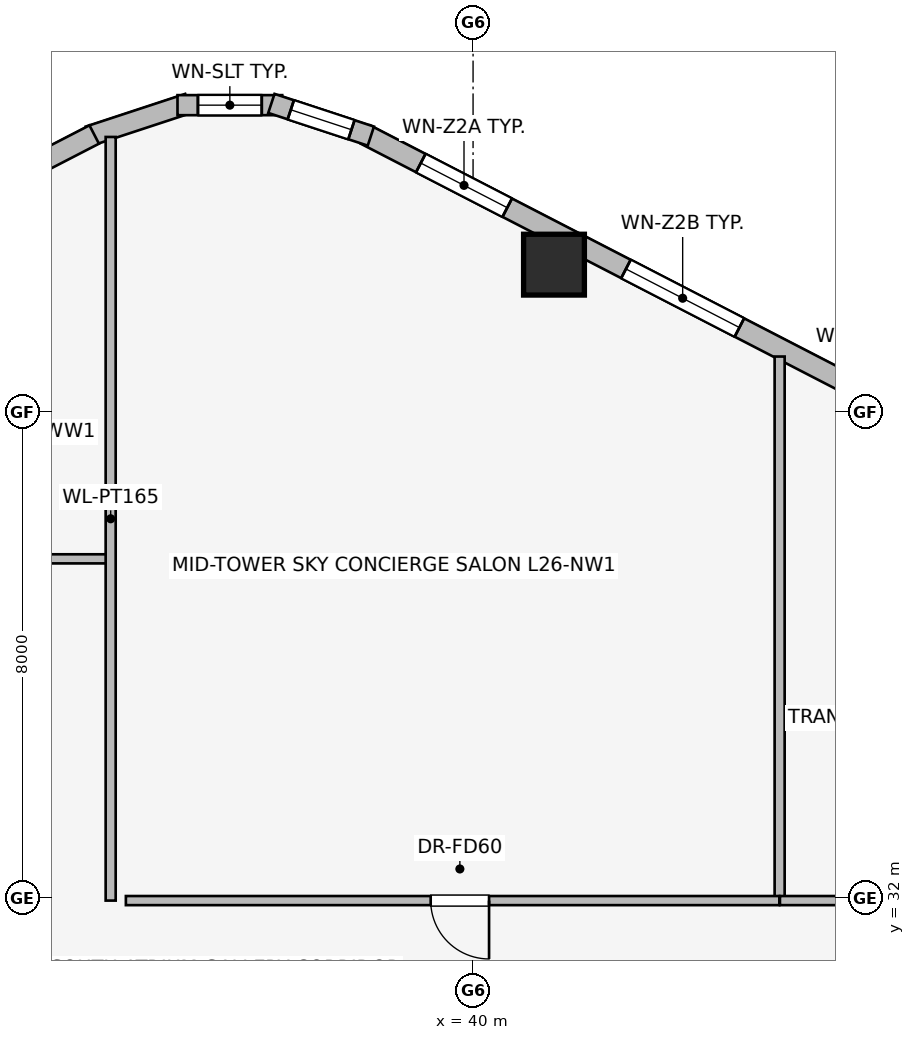
"""IFC4 building model, lengths in metres.
Left out: names, types, materials, properties, quantities, classifications, styles, units other than length and angle.
Written with IfcOpenShell. Run it as: python <this file> out.ifc"""

import sys

from ifc_helpers import new_model, si_unit, direction, frame, frame_2d, origin, origin_2d, place, context, subcontext, project, spatial, rectangle, extrude, element, fill, save


model = new_model("IFC4")
c1 = context("Model", 3, precision=1e-05, world=origin(), true_north=direction((0.0, 1.0)))
c2 = subcontext(c1, "Body", "Model", "MODEL_VIEW")
j1 = project(units=[si_unit("LENGTHUNIT", "METRE"), si_unit("PLANEANGLEUNIT", "RADIAN")], contexts=[c1])
p1 = place(None, origin())
s1 = spatial("IfcSite", under=j1, at=p1, CompositionType="ELEMENT")
p2 = place(p1, origin())
s2 = spatial("IfcBuilding", under=s1, at=p2, CompositionType="ELEMENT")
p3 = place(p2, frame((0.0, 0.0, 101.55)))
s3 = spatial("IfcBuildingStorey", under=s2, at=p3, CompositionType="ELEMENT", Elevation=101.55)
p4 = place(p3, frame((41.331, 42.418, 0.0), z_axis=(0.0, 0.0, 1.0), x_axis=(1.0, 0.0, 0.0)))
e1 = element("IfcColumn", 1, at=p4, inside=s3, PredefinedType="COLUMN", context=c2, shape_type="SweptSolid", body=[
    extrude(rectangle(XDim=1.0, YDim=1.0, at=origin_2d()), origin(), (0.0, 0.0, 1.0), 3.45),
])
p5 = place(p3, frame((38.231, 44.558, 0.0), z_axis=(0.0, 0.0, 1.0), x_axis=(0.888613612362, -0.458656568606, 0.0)))
e2 = element("IfcWall", 2, at=p5, inside=s3, PredefinedType="STANDARD", context=c2, shape_type="SweptSolid", body=[
    extrude(rectangle(XDim=18.681, YDim=0.34, at=frame_2d((9.34, 0.0))), origin(), (0.0, 0.0, 1.0), 3.19),
])
p6 = place(p5, frame((1.023, 0.0, 0.75)))
e3 = element("IfcOpeningElement", 3, at=p6, cuts=e2, PredefinedType="OPENING", context=c2, shape_type="SweptSolid", body=[
    extrude(rectangle(XDim=1.6, YDim=1.55, at=frame_2d((0.8, 0.775))), frame((0.0, 0.18, 0.0), z_axis=(0.0, -1.0, 0.0), x_axis=(1.0, 0.0, 0.0)), (0.0, 0.0, 1.0), 0.36),
])
p7 = place(p5, frame((4.82, 0.0, 0.75)))
e4 = element("IfcOpeningElement", 4, at=p7, cuts=e2, PredefinedType="OPENING", context=c2, shape_type="SweptSolid", body=[
    extrude(rectangle(XDim=2.1, YDim=1.5, at=frame_2d((1.05, 0.75))), frame((0.0, 0.18, 0.0), z_axis=(0.0, -1.0, 0.0), x_axis=(1.0, 0.0, 0.0)), (0.0, 0.0, 1.0), 0.36),
])
p8 = place(p5, frame((8.843, 0.0, 0.75)))
e5 = element("IfcOpeningElement", 5, at=p8, cuts=e2, PredefinedType="OPENING", context=c2, shape_type="SweptSolid", body=[
    extrude(rectangle(XDim=1.6, YDim=1.55, at=frame_2d((0.8, 0.775))), frame((0.0, 0.18, 0.0), z_axis=(0.0, -1.0, 0.0), x_axis=(1.0, 0.0, 0.0)), (0.0, 0.0, 1.0), 0.36),
])
p9 = place(p5, frame((11.951, 0.0, 0.75)))
e6 = element("IfcOpeningElement", 6, at=p9, cuts=e2, PredefinedType="OPENING", context=c2, shape_type="SweptSolid", body=[
    extrude(rectangle(XDim=1.6, YDim=1.55, at=frame_2d((0.8, 0.775))), frame((0.0, 0.18, 0.0), z_axis=(0.0, -1.0, 0.0), x_axis=(1.0, 0.0, 0.0)), (0.0, 0.0, 1.0), 0.36),
])
p10 = place(p5, frame((15.808, 0.0, 0.75)))
e7 = element("IfcOpeningElement", 7, at=p10, cuts=e2, PredefinedType="OPENING", context=c2, shape_type="SweptSolid", body=[
    extrude(rectangle(XDim=2.1, YDim=1.5, at=frame_2d((1.05, 0.75))), frame((0.0, 0.18, 0.0), z_axis=(0.0, -1.0, 0.0), x_axis=(1.0, 0.0, 0.0)), (0.0, 0.0, 1.0), 0.36),
])
p11 = place(p3, frame((33.681, 44.532, 0.0), z_axis=(0.0, 0.0, 1.0), x_axis=(0.949937416267, 0.312440242569, 0.0)))
e8 = element("IfcWall", 8, at=p11, inside=s3, PredefinedType="STANDARD", context=c2, shape_type="SweptSolid", body=[
    extrude(rectangle(XDim=1.722, YDim=0.33, at=frame_2d((0.861, 0.0))), origin(), (0.0, 0.0, 1.0), 3.19),
])
p12 = place(p3, frame((35.139, 45.041, 0.0), z_axis=(0.0, 0.0, 1.0), x_axis=(1.0, 0.0, 0.0)))
e9 = element("IfcWall", 9, at=p12, inside=s3, PredefinedType="STANDARD", context=c2, shape_type="SweptSolid", body=[
    extrude(rectangle(XDim=1.722, YDim=0.33, at=frame_2d((0.861, 0.0))), origin(), (0.0, 0.0, 1.0), 3.19),
])
p13 = place(p12, frame((0.336, 0.0, 0.75)))
e10 = element("IfcOpeningElement", 10, at=p13, cuts=e9, PredefinedType="OPENING", context=c2, shape_type="SweptSolid", body=[
    extrude(rectangle(XDim=1.05, YDim=1.4, at=frame_2d((0.525, 0.7))), frame((0.0, 0.175, 0.0), z_axis=(0.0, -1.0, 0.0), x_axis=(1.0, 0.0, 0.0)), (0.0, 0.0, 1.0), 0.35),
])
p14 = place(p3, frame((36.683, 45.07, 0.0), z_axis=(0.0, 0.0, 1.0), x_axis=(0.949937416267, -0.312440242569, 0.0)))
e11 = element("IfcWall", 11, at=p14, inside=s3, PredefinedType="STANDARD", context=c2, shape_type="SweptSolid", body=[
    extrude(rectangle(XDim=1.722, YDim=0.33, at=frame_2d((0.861, 0.0))), origin(), (0.0, 0.0, 1.0), 3.19),
])
p15 = place(p14, frame((0.336, 0.0, 0.75)))
e12 = element("IfcOpeningElement", 12, at=p15, cuts=e11, PredefinedType="OPENING", context=c2, shape_type="SweptSolid", body=[
    extrude(rectangle(XDim=1.05, YDim=1.4, at=frame_2d((0.525, 0.7))), frame((0.0, 0.175, 0.0), z_axis=(0.0, -1.0, 0.0), x_axis=(1.0, 0.0, 0.0)), (0.0, 0.0, 1.0), 0.35),
])
p16 = place(p3, frame((17.169, 35.99, 0.0), z_axis=(0.0, 0.0, 1.0), x_axis=(0.888613612362, 0.458656568606, 0.0)))
e13 = element("IfcWall", 13, at=p16, inside=s3, PredefinedType="STANDARD", context=c2, shape_type="SweptSolid", body=[
    extrude(rectangle(XDim=18.681, YDim=0.34, at=frame_2d((9.34, 0.0))), origin(), (0.0, 0.0, 1.0), 2.494),
])
p17 = place(p16, frame((1.298, 0.0, 0.75)))
e14 = element("IfcOpeningElement", 14, at=p17, cuts=e13, PredefinedType="OPENING", context=c2, shape_type="SweptSolid", body=[
    extrude(rectangle(XDim=1.05, YDim=1.4, at=frame_2d((0.525, 0.7))), frame((0.0, 0.18, 0.0), z_axis=(0.0, -1.0, 0.0), x_axis=(1.0, 0.0, 0.0)), (0.0, 0.0, 1.0), 0.36),
])
p18 = place(p16, frame((4.981, 0.0, 0.75)))
e15 = element("IfcOpeningElement", 15, at=p18, cuts=e13, PredefinedType="OPENING", context=c2, shape_type="SweptSolid", body=[
    extrude(rectangle(XDim=2.1, YDim=1.5, at=frame_2d((1.05, 0.75))), frame((0.0, 0.18, 0.0), z_axis=(0.0, -1.0, 0.0), x_axis=(1.0, 0.0, 0.0)), (0.0, 0.0, 1.0), 0.36),
])
p19 = place(p16, frame((8.29, 0.0, 0.75)))
e16 = element("IfcOpeningElement", 16, at=p19, cuts=e13, PredefinedType="OPENING", context=c2, shape_type="SweptSolid", body=[
    extrude(rectangle(XDim=2.1, YDim=1.5, at=frame_2d((1.05, 0.75))), frame((0.0, 0.18, 0.0), z_axis=(0.0, -1.0, 0.0), x_axis=(1.0, 0.0, 0.0)), (0.0, 0.0, 1.0), 0.36),
])
p20 = place(p16, frame((11.6, 0.0, 0.75)))
e17 = element("IfcOpeningElement", 17, at=p20, cuts=e13, PredefinedType="OPENING", context=c2, shape_type="SweptSolid", body=[
    extrude(rectangle(XDim=2.1, YDim=1.5, at=frame_2d((1.05, 0.75))), frame((0.0, 0.18, 0.0), z_axis=(0.0, -1.0, 0.0), x_axis=(1.0, 0.0, 0.0)), (0.0, 0.0, 1.0), 0.36),
])
p21 = place(p16, frame((16.333, 0.0, 0.75)))
e18 = element("IfcOpeningElement", 18, at=p21, cuts=e13, PredefinedType="OPENING", context=c2, shape_type="SweptSolid", body=[
    extrude(rectangle(XDim=1.05, YDim=1.4, at=frame_2d((0.525, 0.7))), frame((0.0, 0.18, 0.0), z_axis=(0.0, -1.0, 0.0), x_axis=(1.0, 0.0, 0.0)), (0.0, 0.0, 1.0), 0.36),
])
p22 = place(p3, frame((34.0, 37.58, 0.0), z_axis=(0.0, 0.0, 1.0), x_axis=(-1.0, 0.0, 0.0)))
e19 = element("IfcWall", 19, at=p22, inside=s3, PredefinedType="PARTITIONING", context=c2, shape_type="SweptSolid", body=[
    extrude(rectangle(XDim=13.707, YDim=0.15, at=frame_2d((6.854, 0.0))), origin(), (0.0, 0.0, 1.0), 2.657),
])
p23 = place(p22, frame((5.195, 0.0, 0.0)))
e20 = element("IfcOpeningElement", 20, at=p23, cuts=e19, PredefinedType="OPENING", context=c2, shape_type="SweptSolid", body=[
    extrude(rectangle(XDim=0.96, YDim=2.0, at=frame_2d((0.48, 1.0))), frame((0.0, 0.085, 0.0), z_axis=(0.0, -1.0, 0.0), x_axis=(1.0, 0.0, 0.0)), (0.0, 0.0, 1.0), 0.17),
])
p24 = place(p3, frame((34.04, 31.96, 0.0), z_axis=(0.0, 0.0, 1.0), x_axis=(0.0, 1.0, 0.0)))
e21 = element("IfcWall", 21, at=p24, inside=s3, PredefinedType="PARTITIONING", context=c2, shape_type="SweptSolid", body=[
    extrude(rectangle(XDim=12.558, YDim=0.165, at=frame_2d((6.279, 0.0))), origin(), (0.0, 0.0, 1.0), 3.19),
])
p25 = place(p3, frame((45.042, 31.97, 0.0), z_axis=(0.0, 0.0, 1.0), x_axis=(0.0, 1.0, 0.0)))
e22 = element("IfcWall", 22, at=p25, inside=s3, PredefinedType="PARTITIONING", context=c2, shape_type="SweptSolid", body=[
    extrude(rectangle(XDim=8.937, YDim=0.165, at=frame_2d((4.469, 0.0))), origin(), (0.0, 0.0, 1.0), 3.19),
])
p26 = place(p3, frame((45.037, 31.96, 0.0), z_axis=(0.0, 0.0, 1.0), x_axis=(-1.0, 0.0, 0.0)))
e23 = element("IfcWall", 23, at=p26, inside=s3, PredefinedType="PARTITIONING", context=c2, shape_type="SweptSolid", body=[
    extrude(rectangle(XDim=10.747, YDim=0.15, at=frame_2d((5.374, 0.0))), origin(), (0.0, 0.0, 1.0), 3.19),
])
p27 = place(p26, frame((4.774, 0.0, 0.0)))
e24 = element("IfcOpeningElement", 24, at=p27, cuts=e23, PredefinedType="OPENING", context=c2, shape_type="SweptSolid", body=[
    extrude(rectangle(XDim=0.96, YDim=2.0, at=frame_2d((0.48, 1.0))), frame((0.0, 0.085, 0.0), z_axis=(0.0, -1.0, 0.0), x_axis=(1.0, 0.0, 0.0)), (0.0, 0.0, 1.0), 0.17),
])
p28 = place(p3, frame((56.987, 31.96, 0.0), z_axis=(0.0, 0.0, 1.0), x_axis=(-1.0, 0.0, 0.0)))
e25 = element("IfcWall", 25, at=p28, inside=s3, PredefinedType="PARTITIONING", context=c2, shape_type="SweptSolid", body=[
    extrude(rectangle(XDim=11.94, YDim=0.15, at=frame_2d((5.97, 0.0))), origin(), (0.0, 0.0, 1.0), 3.19),
])
p29 = place(p28, frame((5.61, 0.0, 0.0)))
e26 = element("IfcOpeningElement", 26, at=p29, cuts=e25, PredefinedType="OPENING", context=c2, shape_type="SweptSolid", body=[
    extrude(rectangle(XDim=0.96, YDim=2.0, at=frame_2d((0.48, 1.0))), frame((0.0, 0.085, 0.0), z_axis=(0.0, -1.0, 0.0), x_axis=(1.0, 0.0, 0.0)), (0.0, 0.0, 1.0), 0.17),
])
p30 = place(p6, origin())
e27 = element("IfcWindow", 27, at=p30, inside=s3, PartitioningType="SINGLE_PANEL", PredefinedType="WINDOW", context=c2, shape_type="SweptSolid", body=[
    extrude(rectangle(XDim=1.6, YDim=1.55, at=frame_2d((0.8, 0.775))), frame((0.0, 0.03, 0.0), z_axis=(0.0, -1.0, 0.0), x_axis=(1.0, 0.0, 0.0)), (0.0, 0.0, 1.0), 0.06),
])
fill(e3, e27)
p31 = place(p7, origin())
e28 = element("IfcWindow", 28, at=p31, inside=s3, PartitioningType="SINGLE_PANEL", PredefinedType="WINDOW", context=c2, shape_type="SweptSolid", body=[
    extrude(rectangle(XDim=2.1, YDim=1.5, at=frame_2d((1.05, 0.75))), frame((0.0, 0.03, 0.0), z_axis=(0.0, -1.0, 0.0), x_axis=(1.0, 0.0, 0.0)), (0.0, 0.0, 1.0), 0.06),
])
fill(e4, e28)
p32 = place(p13, origin())
e29 = element("IfcWindow", 29, at=p32, inside=s3, PartitioningType="SINGLE_PANEL", PredefinedType="WINDOW", context=c2, shape_type="SweptSolid", body=[
    extrude(rectangle(XDim=1.05, YDim=1.4, at=frame_2d((0.525, 0.7))), frame((0.0, 0.03, 0.0), z_axis=(0.0, -1.0, 0.0), x_axis=(1.0, 0.0, 0.0)), (0.0, 0.0, 1.0), 0.06),
])
fill(e10, e29)
p33 = place(p15, origin())
e30 = element("IfcWindow", 30, at=p33, inside=s3, PartitioningType="SINGLE_PANEL", PredefinedType="WINDOW", context=c2, shape_type="SweptSolid", body=[
    extrude(rectangle(XDim=1.05, YDim=1.4, at=frame_2d((0.525, 0.7))), frame((0.0, 0.03, 0.0), z_axis=(0.0, -1.0, 0.0), x_axis=(1.0, 0.0, 0.0)), (0.0, 0.0, 1.0), 0.06),
])
fill(e12, e30)
p34 = place(p27, origin())
e31 = element("IfcDoor", 31, at=p34, inside=s3, OperationType="SINGLE_SWING_LEFT", PredefinedType="DOOR", context=c2, shape_type="SweptSolid", body=[
    extrude(rectangle(XDim=0.96, YDim=2.0, at=frame_2d((0.48, 1.0))), frame((0.0, 0.025, 0.0), z_axis=(0.0, -1.0, 0.0), x_axis=(1.0, 0.0, 0.0)), (0.0, 0.0, 1.0), 0.05),
])
fill(e24, e31)
save(model, sys.argv[1])
